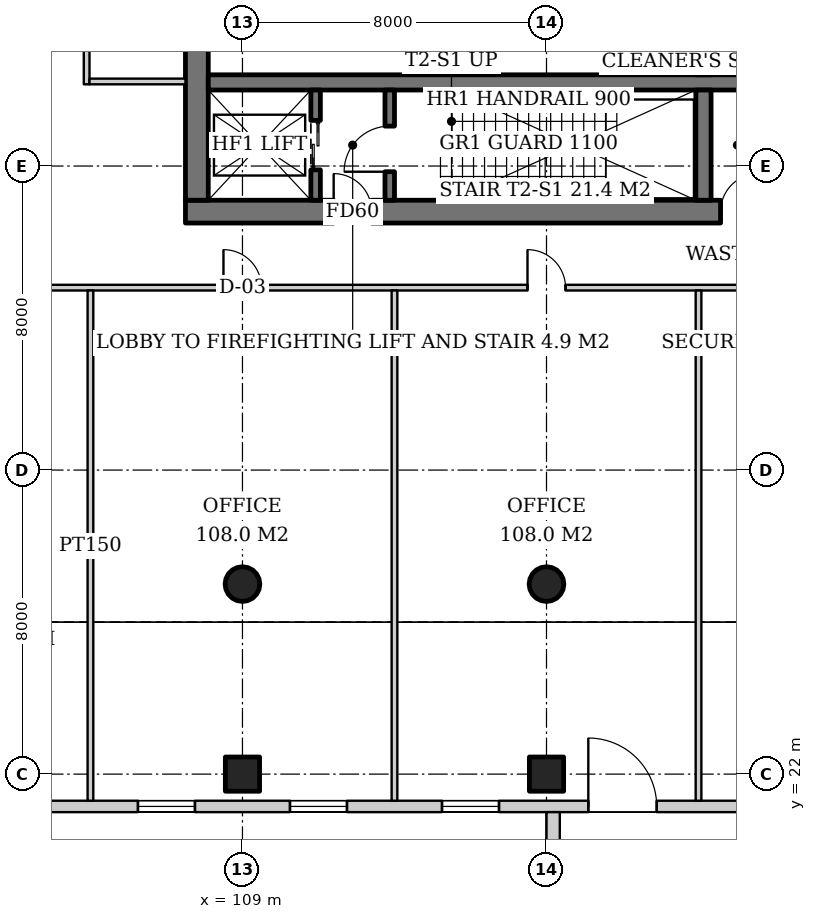
"""IFC4 building model, lengths in metres.
Left out: names, types, materials, properties, quantities, classifications, styles, units other than length and angle.
Written with IfcOpenShell. Run it as: python <this file> out.ifc"""

import sys

from ifc_helpers import new_model, si_unit, direction, frame, frame_2d, origin, origin_2d, place, context, subcontext, project, spatial, rectangle, hollow_circle, extrude, element, fill, save


model = new_model("IFC4")
c1 = context("Model", 3, precision=1e-05, world=origin(), true_north=direction((0.0, 1.0)))
c2 = subcontext(c1, "Body", "Model", "MODEL_VIEW")
j1 = project(units=[si_unit("LENGTHUNIT", "METRE"), si_unit("PLANEANGLEUNIT", "RADIAN")], contexts=[c1])
p1 = place(None, origin())
s1 = spatial("IfcSite", under=j1, at=p1, CompositionType="ELEMENT")
p2 = place(p1, origin())
s2 = spatial("IfcBuilding", under=s1, at=p2, CompositionType="ELEMENT")
p3 = place(p2, frame((0.0, 0.0, 11.0)))
s3 = spatial("IfcBuildingStorey", under=s2, at=p3, CompositionType="ELEMENT", Elevation=11.0)
for number, where, z_axis, x_axis in (
    (1, (109.0, 22.0, 0.0), (0.0, 0.0, 1.0), (1.0, 0.0, 0.0)),
    (2, (117.0, 22.0, 0.0), (0.0, 0.0, 1.0), (1.0, 0.0, 0.0)),
):
    element("IfcColumn", number, at=place(p3, frame(where, z_axis=z_axis, x_axis=x_axis)), inside=s3, PredefinedType="COLUMN", context=c2, shape_type="SweptSolid", body=[
        extrude(rectangle(XDim=0.9, YDim=0.9, at=origin_2d()), origin(), (0.0, 0.0, 1.0), 5.0),
    ])
for number, where, z_axis, x_axis in (
    (3, (109.0, 27.0, 0.0), (0.0, 0.0, 1.0), (1.0, 0.0, 0.0)),
    (4, (117.0, 27.0, 0.0), (0.0, 0.0, 1.0), (1.0, 0.0, 0.0)),
):
    element("IfcColumn", number, at=place(p3, frame(where, z_axis=z_axis, x_axis=x_axis)), inside=s3, PredefinedType="COLUMN", context=c2, shape_type="SweptSolid", body=[
        extrude(hollow_circle(Radius=0.457, WallThickness=0.03, at=origin_2d()), origin(), (0.0, 0.0, 1.0), 5.0),
    ])
p4 = place(p3, frame((107.5, 36.8, 0.0), z_axis=(0.0, 0.0, 1.0), x_axis=(1.0, 0.0, 0.0)))
e5 = element("IfcWall", 5, at=p4, inside=s3, PredefinedType="SHEAR", context=c2, shape_type="SweptSolid", body=[
    extrude(rectangle(XDim=19.0, YDim=0.6, at=frame_2d((9.5, 0.0))), origin(), (0.0, 0.0, 1.0), 5.0),
])
p5 = place(p4, frame((3.9, 0.0, 0.0)))
e6 = element("IfcOpeningElement", 6, at=p5, cuts=e5, PredefinedType="OPENING", context=c2, shape_type="SweptSolid", body=[
    extrude(rectangle(XDim=1.0, YDim=2.1, at=frame_2d((0.5, 1.05))), frame((0.0, 0.31, 0.0), z_axis=(0.0, -1.0, 0.0), x_axis=(1.0, 0.0, 0.0)), (0.0, 0.0, 1.0), 0.62),
])
p6 = place(p4, frame((14.08, 0.0, 0.0)))
e7 = element("IfcOpeningElement", 7, at=p6, cuts=e5, PredefinedType="OPENING", context=c2, shape_type="SweptSolid", body=[
    extrude(rectangle(XDim=1.0, YDim=2.1, at=frame_2d((0.5, 1.05))), frame((0.0, 0.31, 0.0), z_axis=(0.0, -1.0, 0.0), x_axis=(1.0, 0.0, 0.0)), (0.0, 0.0, 1.0), 0.62),
])
p7 = place(p4, frame((15.615, 0.0, 0.0)))
e8 = element("IfcOpeningElement", 8, at=p7, cuts=e5, PredefinedType="OPENING", context=c2, shape_type="SweptSolid", body=[
    extrude(rectangle(XDim=1.0, YDim=2.1, at=frame_2d((0.5, 1.05))), frame((0.0, 0.31, 0.0), z_axis=(0.0, -1.0, 0.0), x_axis=(1.0, 0.0, 0.0)), (0.0, 0.0, 1.0), 0.62),
])
p8 = place(p4, frame((17.188, 0.0, 0.0)))
e9 = element("IfcOpeningElement", 9, at=p8, cuts=e5, PredefinedType="OPENING", context=c2, shape_type="SweptSolid", body=[
    extrude(rectangle(XDim=1.0, YDim=2.1, at=frame_2d((0.5, 1.05))), frame((0.0, 0.31, 0.0), z_axis=(0.0, -1.0, 0.0), x_axis=(1.0, 0.0, 0.0)), (0.0, 0.0, 1.0), 0.62),
])
p9 = place(p3, frame((107.8, 37.1, 0.0), z_axis=(0.0, 0.0, 1.0), x_axis=(0.0, 1.0, 0.0)))
e10 = element("IfcWall", 10, at=p9, inside=s3, PredefinedType="SHEAR", context=c2, shape_type="SweptSolid", body=[
    extrude(rectangle(XDim=17.8, YDim=0.6, at=frame_2d((8.9, 0.0))), origin(), (0.0, 0.0, 1.0), 5.0),
])
p10 = place(p9, frame((8.0, 0.0, 0.0)))
e11 = element("IfcOpeningElement", 11, at=p10, cuts=e10, PredefinedType="OPENING", context=c2, shape_type="SweptSolid", body=[
    extrude(rectangle(XDim=1.8, YDim=2.4, at=frame_2d((0.9, 1.2))), frame((0.0, 0.31, 0.0), z_axis=(0.0, -1.0, 0.0), x_axis=(1.0, 0.0, 0.0)), (0.0, 0.0, 1.0), 0.62),
])
p11 = place(p3, frame((108.1, 40.2, 0.0), z_axis=(0.0, 0.0, 1.0), x_axis=(1.0, 0.0, 0.0)))
e12 = element("IfcWall", 12, at=p11, inside=s3, PredefinedType="SHEAR", context=c2, shape_type="SweptSolid", body=[
    extrude(rectangle(XDim=17.8, YDim=0.4, at=frame_2d((8.9, 0.0))), origin(), (0.0, 0.0, 1.0), 5.0),
])
p12 = place(p3, frame((121.13, 37.1, 0.0), z_axis=(0.0, 0.0, 1.0), x_axis=(0.0, 1.0, 0.0)))
e13 = element("IfcWall", 13, at=p12, inside=s3, PredefinedType="SHEAR", context=c2, shape_type="SweptSolid", body=[
    extrude(rectangle(XDim=2.9, YDim=0.4, at=frame_2d((1.45, 0.0))), origin(), (0.0, 0.0, 1.0), 5.0),
])
p13 = place(p3, frame((121.13, 40.4, 0.0), z_axis=(0.0, 0.0, 1.0), x_axis=(0.0, 1.0, 0.0)))
e14 = element("IfcWall", 14, at=p13, inside=s3, PredefinedType="SHEAR", context=c2, shape_type="SweptSolid", body=[
    extrude(rectangle(XDim=11.2, YDim=0.4, at=frame_2d((5.6, 0.0))), origin(), (0.0, 0.0, 1.0), 5.0),
])
p14 = place(p3, frame((92.0, 21.15, 0.0), z_axis=(0.0, 0.0, 1.0), x_axis=(1.0, 0.0, 0.0)))
e15 = element("IfcWall", 15, at=p14, inside=s3, PredefinedType="SOLIDWALL", context=c2, shape_type="SweptSolid", body=[
    extrude(rectangle(XDim=50.0, YDim=0.3, at=frame_2d((25.0, 0.0))), origin(), (0.0, 0.0, 1.0), 4.7),
])
p15 = place(p14, frame((1.5, 0.0, 0.9)))
e16 = element("IfcOpeningElement", 16, at=p15, cuts=e15, PredefinedType="OPENING", context=c2, shape_type="SweptSolid", body=[
    extrude(rectangle(XDim=1.5, YDim=3.2, at=frame_2d((0.75, 1.6))), frame((0.0, 0.16, 0.0), z_axis=(0.0, -1.0, 0.0), x_axis=(1.0, 0.0, 0.0)), (0.0, 0.0, 1.0), 0.32),
])
p16 = place(p14, frame((6.0, 0.0, 0.9)))
e17 = element("IfcOpeningElement", 17, at=p16, cuts=e15, PredefinedType="OPENING", context=c2, shape_type="SweptSolid", body=[
    extrude(rectangle(XDim=1.5, YDim=3.2, at=frame_2d((0.75, 1.6))), frame((0.0, 0.16, 0.0), z_axis=(0.0, -1.0, 0.0), x_axis=(1.0, 0.0, 0.0)), (0.0, 0.0, 1.0), 0.32),
])
p17 = place(p14, frame((10.25, 0.0, 0.9)))
e18 = element("IfcOpeningElement", 18, at=p17, cuts=e15, PredefinedType="OPENING", context=c2, shape_type="SweptSolid", body=[
    extrude(rectangle(XDim=1.5, YDim=3.2, at=frame_2d((0.75, 1.6))), frame((0.0, 0.16, 0.0), z_axis=(0.0, -1.0, 0.0), x_axis=(1.0, 0.0, 0.0)), (0.0, 0.0, 1.0), 0.32),
])
p18 = place(p14, frame((14.25, 0.0, 0.9)))
e19 = element("IfcOpeningElement", 19, at=p18, cuts=e15, PredefinedType="OPENING", context=c2, shape_type="SweptSolid", body=[
    extrude(rectangle(XDim=1.5, YDim=3.2, at=frame_2d((0.75, 1.6))), frame((0.0, 0.16, 0.0), z_axis=(0.0, -1.0, 0.0), x_axis=(1.0, 0.0, 0.0)), (0.0, 0.0, 1.0), 0.32),
])
p19 = place(p14, frame((18.25, 0.0, 0.9)))
e20 = element("IfcOpeningElement", 20, at=p19, cuts=e15, PredefinedType="OPENING", context=c2, shape_type="SweptSolid", body=[
    extrude(rectangle(XDim=1.5, YDim=3.2, at=frame_2d((0.75, 1.6))), frame((0.0, 0.16, 0.0), z_axis=(0.0, -1.0, 0.0), x_axis=(1.0, 0.0, 0.0)), (0.0, 0.0, 1.0), 0.32),
])
p20 = place(p14, frame((22.25, 0.0, 0.9)))
e21 = element("IfcOpeningElement", 21, at=p20, cuts=e15, PredefinedType="OPENING", context=c2, shape_type="SweptSolid", body=[
    extrude(rectangle(XDim=1.5, YDim=3.2, at=frame_2d((0.75, 1.6))), frame((0.0, 0.16, 0.0), z_axis=(0.0, -1.0, 0.0), x_axis=(1.0, 0.0, 0.0)), (0.0, 0.0, 1.0), 0.32),
])
p21 = place(p14, frame((26.1, 0.0, 0.0)))
e22 = element("IfcOpeningElement", 22, at=p21, cuts=e15, PredefinedType="OPENING", context=c2, shape_type="SweptSolid", body=[
    extrude(rectangle(XDim=1.8, YDim=2.4, at=frame_2d((0.9, 1.2))), frame((0.0, 0.16, 0.0), z_axis=(0.0, -1.0, 0.0), x_axis=(1.0, 0.0, 0.0)), (0.0, 0.0, 1.0), 0.32),
])
p22 = place(p14, frame((30.25, 0.0, 0.9)))
e23 = element("IfcOpeningElement", 23, at=p22, cuts=e15, PredefinedType="OPENING", context=c2, shape_type="SweptSolid", body=[
    extrude(rectangle(XDim=1.5, YDim=3.2, at=frame_2d((0.75, 1.6))), frame((0.0, 0.16, 0.0), z_axis=(0.0, -1.0, 0.0), x_axis=(1.0, 0.0, 0.0)), (0.0, 0.0, 1.0), 0.32),
])
p23 = place(p14, frame((34.25, 0.0, 0.9)))
e24 = element("IfcOpeningElement", 24, at=p23, cuts=e15, PredefinedType="OPENING", context=c2, shape_type="SweptSolid", body=[
    extrude(rectangle(XDim=1.5, YDim=3.2, at=frame_2d((0.75, 1.6))), frame((0.0, 0.16, 0.0), z_axis=(0.0, -1.0, 0.0), x_axis=(1.0, 0.0, 0.0)), (0.0, 0.0, 1.0), 0.32),
])
p24 = place(p14, frame((38.25, 0.0, 0.9)))
e25 = element("IfcOpeningElement", 25, at=p24, cuts=e15, PredefinedType="OPENING", context=c2, shape_type="SweptSolid", body=[
    extrude(rectangle(XDim=1.5, YDim=3.2, at=frame_2d((0.75, 1.6))), frame((0.0, 0.16, 0.0), z_axis=(0.0, -1.0, 0.0), x_axis=(1.0, 0.0, 0.0)), (0.0, 0.0, 1.0), 0.32),
])
p25 = place(p14, frame((42.5, 0.0, 0.9)))
e26 = element("IfcOpeningElement", 26, at=p25, cuts=e15, PredefinedType="OPENING", context=c2, shape_type="SweptSolid", body=[
    extrude(rectangle(XDim=1.5, YDim=3.2, at=frame_2d((0.75, 1.6))), frame((0.0, 0.16, 0.0), z_axis=(0.0, -1.0, 0.0), x_axis=(1.0, 0.0, 0.0)), (0.0, 0.0, 1.0), 0.32),
])
p26 = place(p14, frame((47.0, 0.0, 0.9)))
e27 = element("IfcOpeningElement", 27, at=p26, cuts=e15, PredefinedType="OPENING", context=c2, shape_type="SweptSolid", body=[
    extrude(rectangle(XDim=1.5, YDim=3.2, at=frame_2d((0.75, 1.6))), frame((0.0, 0.16, 0.0), z_axis=(0.0, -1.0, 0.0), x_axis=(1.0, 0.0, 0.0)), (0.0, 0.0, 1.0), 0.32),
])
p27 = place(p3, frame((117.175, 13.0, 0.0), z_axis=(0.0, 0.0, 1.0), x_axis=(0.0, 1.0, 0.0)))
e28 = element("IfcWall", 28, at=p27, inside=s3, PredefinedType="PARAPET", context=c2, shape_type="SweptSolid", body=[
    extrude(rectangle(XDim=8.0, YDim=0.35, at=frame_2d((4.0, 0.0))), origin(), (0.0, 0.0, 1.0), 1.1),
])
p28 = place(p3, frame((110.925, 37.1, 0.0), z_axis=(0.0, 0.0, 1.0), x_axis=(0.0, 1.0, 0.0)))
e29 = element("IfcWall", 29, at=p28, inside=s3, PredefinedType="SHEAR", context=c2, shape_type="SweptSolid", body=[
    extrude(rectangle(XDim=2.9, YDim=0.25, at=frame_2d((1.45, 0.0))), origin(), (0.0, 0.0, 1.0), 5.0),
])
p29 = place(p28, frame((0.8, 0.0, 0.0)))
e30 = element("IfcOpeningElement", 30, at=p29, cuts=e29, PredefinedType="OPENING", context=c2, shape_type="SweptSolid", body=[
    extrude(rectangle(XDim=1.3, YDim=2.2, at=frame_2d((0.65, 1.1))), frame((0.0, 0.135, 0.0), z_axis=(0.0, -1.0, 0.0), x_axis=(1.0, 0.0, 0.0)), (0.0, 0.0, 1.0), 0.27),
])
p30 = place(p3, frame((112.875, 37.1, 0.0), z_axis=(0.0, 0.0, 1.0), x_axis=(0.0, 1.0, 0.0)))
e31 = element("IfcWall", 31, at=p30, inside=s3, PredefinedType="SHEAR", context=c2, shape_type="SweptSolid", body=[
    extrude(rectangle(XDim=2.9, YDim=0.25, at=frame_2d((1.45, 0.0))), origin(), (0.0, 0.0, 1.0), 5.0),
])
p31 = place(p30, frame((0.75, 0.0, 0.0)))
e32 = element("IfcOpeningElement", 32, at=p31, cuts=e31, PredefinedType="OPENING", context=c2, shape_type="SweptSolid", body=[
    extrude(rectangle(XDim=1.2, YDim=2.1, at=frame_2d((0.6, 1.05))), frame((0.0, 0.135, 0.0), z_axis=(0.0, -1.0, 0.0), x_axis=(1.0, 0.0, 0.0)), (0.0, 0.0, 1.0), 0.27),
])
p32 = place(p3, frame((104.9, 43.9, 0.0), z_axis=(0.0, 0.0, 1.0), x_axis=(0.0, -1.0, 0.0)))
e33 = element("IfcWall", 33, at=p32, inside=s3, PredefinedType="PARTITIONING", context=c2, shape_type="SweptSolid", body=[
    extrude(rectangle(XDim=3.75, YDim=0.15, at=frame_2d((1.875, 0.0))), origin(), (0.0, 0.0, 1.0), 3.947),
])
p33 = place(p32, frame((1.475, 0.0, 0.0)))
e34 = element("IfcOpeningElement", 34, at=p33, cuts=e33, PredefinedType="OPENING", context=c2, shape_type="SweptSolid", body=[
    extrude(rectangle(XDim=0.8, YDim=2.1, at=frame_2d((0.4, 1.05))), frame((0.0, 0.085, 0.0), z_axis=(0.0, -1.0, 0.0), x_axis=(1.0, 0.0, 0.0)), (0.0, 0.0, 1.0), 0.17),
])
p34 = place(p3, frame((104.975, 40.225, 0.0), z_axis=(0.0, 0.0, 1.0), x_axis=(1.0, 0.0, 0.0)))
e35 = element("IfcWall", 35, at=p34, inside=s3, PredefinedType="PARTITIONING", context=c2, shape_type="SweptSolid", body=[
    extrude(rectangle(XDim=2.525, YDim=0.15, at=frame_2d((1.262, 0.0))), origin(), (0.0, 0.0, 1.0), 4.7),
])
p35 = place(p3, frame((97.225, 34.8, 0.0), z_axis=(0.0, 0.0, 1.0), x_axis=(1.0, 0.0, 0.0)))
e36 = element("IfcWall", 36, at=p35, inside=s3, PredefinedType="PARTITIONING", context=c2, shape_type="SweptSolid", body=[
    extrude(rectangle(XDim=39.55, YDim=0.15, at=frame_2d((19.775, 0.0))), origin(), (0.0, 0.0, 1.0), 3.9),
])
p36 = place(p35, frame((3.025, 0.0, 0.0)))
e37 = element("IfcOpeningElement", 37, at=p36, cuts=e36, PredefinedType="OPENING", context=c2, shape_type="SweptSolid", body=[
    extrude(rectangle(XDim=1.8, YDim=2.4, at=frame_2d((0.9, 1.2))), frame((0.0, 0.085, 0.0), z_axis=(0.0, -1.0, 0.0), x_axis=(1.0, 0.0, 0.0)), (0.0, 0.0, 1.0), 0.17),
])
p37 = place(p35, frame((11.275, 0.0, 0.0)))
e38 = element("IfcOpeningElement", 38, at=p37, cuts=e36, PredefinedType="OPENING", context=c2, shape_type="SweptSolid", body=[
    extrude(rectangle(XDim=1.0, YDim=2.1, at=frame_2d((0.5, 1.05))), frame((0.0, 0.085, 0.0), z_axis=(0.0, -1.0, 0.0), x_axis=(1.0, 0.0, 0.0)), (0.0, 0.0, 1.0), 0.17),
])
p38 = place(p35, frame((19.275, 0.0, 0.0)))
e39 = element("IfcOpeningElement", 39, at=p38, cuts=e36, PredefinedType="OPENING", context=c2, shape_type="SweptSolid", body=[
    extrude(rectangle(XDim=1.0, YDim=2.1, at=frame_2d((0.5, 1.05))), frame((0.0, 0.085, 0.0), z_axis=(0.0, -1.0, 0.0), x_axis=(1.0, 0.0, 0.0)), (0.0, 0.0, 1.0), 0.17),
])
p39 = place(p35, frame((27.275, 0.0, 0.0)))
e40 = element("IfcOpeningElement", 40, at=p39, cuts=e36, PredefinedType="OPENING", context=c2, shape_type="SweptSolid", body=[
    extrude(rectangle(XDim=1.0, YDim=2.1, at=frame_2d((0.5, 1.05))), frame((0.0, 0.085, 0.0), z_axis=(0.0, -1.0, 0.0), x_axis=(1.0, 0.0, 0.0)), (0.0, 0.0, 1.0), 0.17),
])
p40 = place(p35, frame((35.125, 0.0, 0.0)))
e41 = element("IfcOpeningElement", 41, at=p40, cuts=e36, PredefinedType="OPENING", context=c2, shape_type="SweptSolid", body=[
    extrude(rectangle(XDim=1.0, YDim=2.1, at=frame_2d((0.5, 1.05))), frame((0.0, 0.085, 0.0), z_axis=(0.0, -1.0, 0.0), x_axis=(1.0, 0.0, 0.0)), (0.0, 0.0, 1.0), 0.17),
])
for number, where, z_axis, x_axis in (
    (42, (105.0, 21.3, 0.0), (0.0, 0.0, 1.0), (0.0, 1.0, 0.0)),
    (43, (113.0, 21.3, 0.0), (0.0, 0.0, 1.0), (0.0, 1.0, 0.0)),
    (44, (121.0, 21.3, 0.0), (0.0, 0.0, 1.0), (0.0, 1.0, 0.0)),
):
    element("IfcWall", number, at=place(p3, frame(where, z_axis=z_axis, x_axis=x_axis)), inside=s3, PredefinedType="PARTITIONING", context=c2, shape_type="SweptSolid", body=[
        extrude(rectangle(XDim=13.425, YDim=0.15, at=frame_2d((6.712, 0.0))), origin(), (0.0, 0.0, 1.0), 4.15),
    ])
p41 = place(p18, origin())
e45 = element("IfcWindow", 45, at=p41, inside=s3, PartitioningType="SINGLE_PANEL", PredefinedType="WINDOW", context=c2, shape_type="SweptSolid", body=[
    extrude(rectangle(XDim=1.5, YDim=3.2, at=frame_2d((0.75, 1.6))), frame((0.0, 0.03, 0.0), z_axis=(0.0, -1.0, 0.0), x_axis=(1.0, 0.0, 0.0)), (0.0, 0.0, 1.0), 0.06),
])
fill(e19, e45)
p42 = place(p19, origin())
e46 = element("IfcWindow", 46, at=p42, inside=s3, PartitioningType="SINGLE_PANEL", PredefinedType="WINDOW", context=c2, shape_type="SweptSolid", body=[
    extrude(rectangle(XDim=1.5, YDim=3.2, at=frame_2d((0.75, 1.6))), frame((0.0, 0.03, 0.0), z_axis=(0.0, -1.0, 0.0), x_axis=(1.0, 0.0, 0.0)), (0.0, 0.0, 1.0), 0.06),
])
fill(e20, e46)
p43 = place(p20, origin())
e47 = element("IfcWindow", 47, at=p43, inside=s3, PartitioningType="SINGLE_PANEL", PredefinedType="WINDOW", context=c2, shape_type="SweptSolid", body=[
    extrude(rectangle(XDim=1.5, YDim=3.2, at=frame_2d((0.75, 1.6))), frame((0.0, 0.03, 0.0), z_axis=(0.0, -1.0, 0.0), x_axis=(1.0, 0.0, 0.0)), (0.0, 0.0, 1.0), 0.06),
])
fill(e21, e47)
p44 = place(p21, origin())
e48 = element("IfcDoor", 48, at=p44, inside=s3, OperationType="DOUBLE_DOOR_SINGLE_SWING", PredefinedType="DOOR", context=c2, shape_type="SweptSolid", body=[
    extrude(rectangle(XDim=1.8, YDim=2.4, at=frame_2d((0.9, 1.2))), frame((0.0, 0.025, 0.0), z_axis=(0.0, -1.0, 0.0), x_axis=(1.0, 0.0, 0.0)), (0.0, 0.0, 1.0), 0.05),
])
fill(e22, e48)
p45 = place(p29, origin())
e49 = element("IfcDoor", 49, at=p45, inside=s3, OperationType="DOUBLE_DOOR_SLIDING", PredefinedType="DOOR", context=c2, shape_type="SweptSolid", body=[
    extrude(rectangle(XDim=1.3, YDim=2.2, at=frame_2d((0.65, 1.1))), frame((0.0, 0.025, 0.0), z_axis=(0.0, -1.0, 0.0), x_axis=(1.0, 0.0, 0.0)), (0.0, 0.0, 1.0), 0.05),
])
fill(e30, e49)
p46 = place(p31, origin())
e50 = element("IfcDoor", 50, at=p46, inside=s3, OperationType="SINGLE_SWING_LEFT", PredefinedType="DOOR", context=c2, shape_type="SweptSolid", body=[
    extrude(rectangle(XDim=1.2, YDim=2.1, at=frame_2d((0.6, 1.05))), frame((0.0, 0.025, 0.0), z_axis=(0.0, -1.0, 0.0), x_axis=(1.0, 0.0, 0.0)), (0.0, 0.0, 1.0), 0.05),
])
fill(e32, e50)
p47 = place(p5, origin())
e51 = element("IfcDoor", 51, at=p47, inside=s3, OperationType="SINGLE_SWING_LEFT", PredefinedType="DOOR", context=c2, shape_type="SweptSolid", body=[
    extrude(rectangle(XDim=1.0, YDim=2.1, at=frame_2d((0.5, 1.05))), frame((0.0, 0.025, 0.0), z_axis=(0.0, -1.0, 0.0), x_axis=(1.0, 0.0, 0.0)), (0.0, 0.0, 1.0), 0.05),
])
fill(e6, e51)
p48 = place(p6, origin())
e52 = element("IfcDoor", 52, at=p48, inside=s3, OperationType="SINGLE_SWING_RIGHT", PredefinedType="DOOR", context=c2, shape_type="SweptSolid", body=[
    extrude(rectangle(XDim=1.0, YDim=2.1, at=frame_2d((0.5, 1.05))), frame((0.0, 0.29, 0.0), z_axis=(0.0, -1.0, 0.0), x_axis=(1.0, 0.0, 0.0)), (0.0, 0.0, 1.0), 0.05),
])
fill(e7, e52)
p49 = place(p37, origin())
e53 = element("IfcDoor", 53, at=p49, inside=s3, OperationType="SINGLE_SWING_LEFT", PredefinedType="DOOR", context=c2, shape_type="SweptSolid", body=[
    extrude(rectangle(XDim=1.0, YDim=2.1, at=frame_2d((0.5, 1.05))), frame((0.0, 0.025, 0.0), z_axis=(0.0, -1.0, 0.0), x_axis=(1.0, 0.0, 0.0)), (0.0, 0.0, 1.0), 0.05),
])
fill(e38, e53)
p50 = place(p38, origin())
e54 = element("IfcDoor", 54, at=p50, inside=s3, OperationType="SINGLE_SWING_LEFT", PredefinedType="DOOR", context=c2, shape_type="SweptSolid", body=[
    extrude(rectangle(XDim=1.0, YDim=2.1, at=frame_2d((0.5, 1.05))), frame((0.0, 0.025, 0.0), z_axis=(0.0, -1.0, 0.0), x_axis=(1.0, 0.0, 0.0)), (0.0, 0.0, 1.0), 0.05),
])
fill(e39, e54)
save(model, sys.argv[1])
